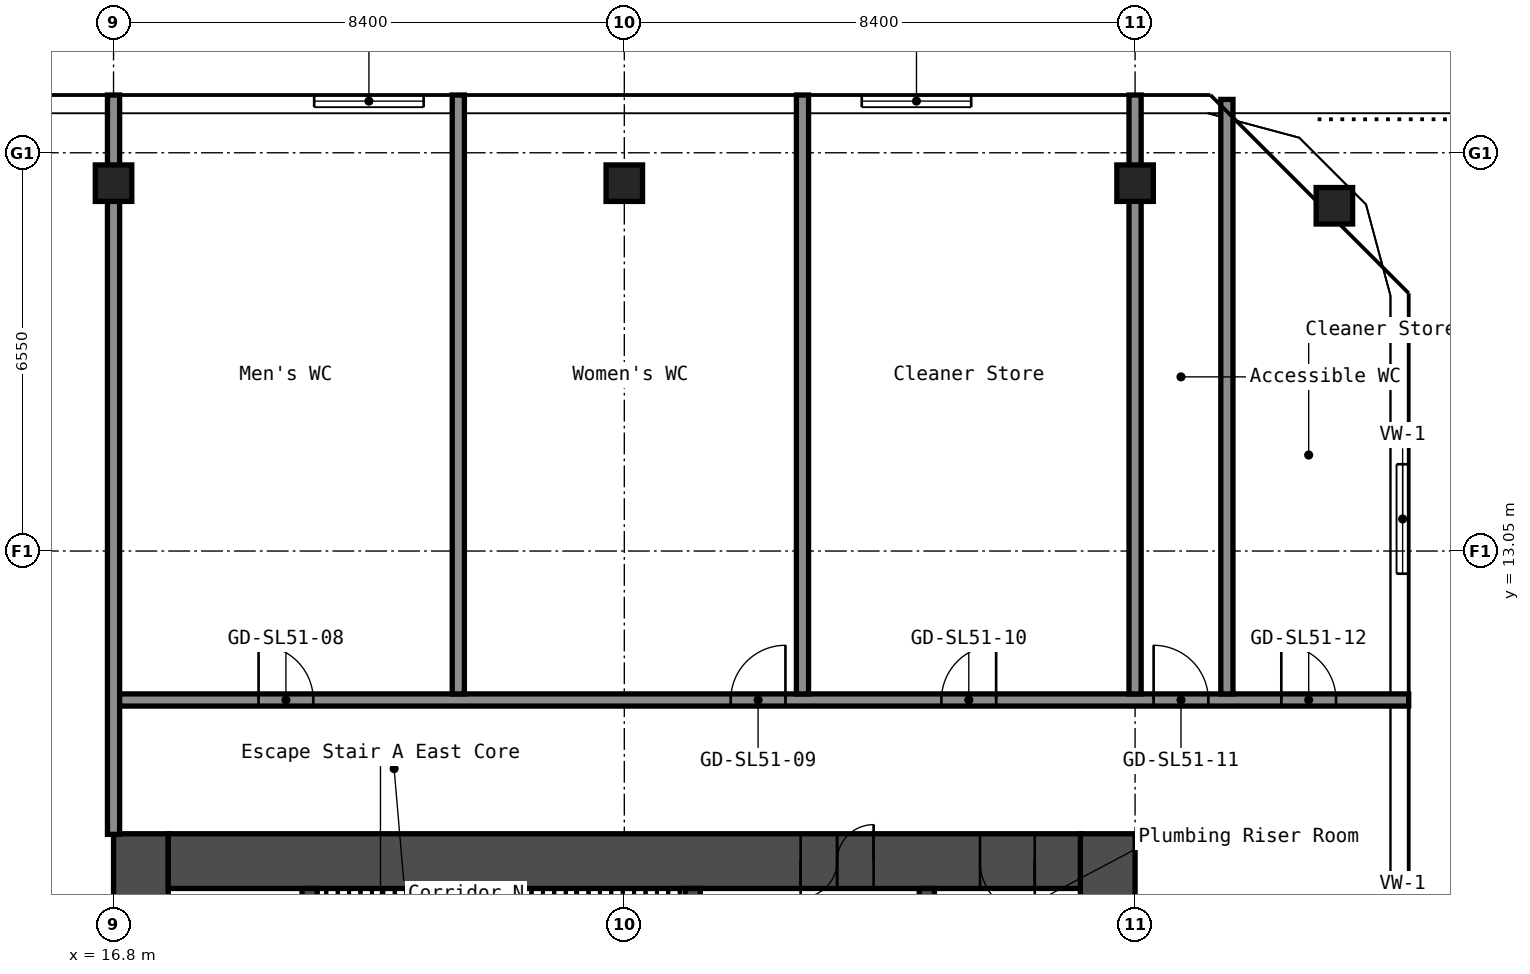
"""IFC4 building model, lengths in metres.
Left out: names, types, materials, properties, quantities, classifications, styles, units other than length and angle.
Written with IfcOpenShell. Run it as: python <this file> out.ifc"""

import sys

from ifc_helpers import new_model, si_unit, direction, frame, frame_2d, origin, origin_2d, place, context, subcontext, project, spatial, rectangle, hollow_rectangle, extrude, element, fill, save


model = new_model("IFC4")
c1 = context("Model", 3, precision=1e-05, world=origin(), true_north=direction((0.0, 1.0)))
c2 = subcontext(c1, "Body", "Model", "MODEL_VIEW")
j1 = project(units=[si_unit("LENGTHUNIT", "METRE"), si_unit("PLANEANGLEUNIT", "RADIAN")], contexts=[c1])
p1 = place(None, origin())
s1 = spatial("IfcSite", under=j1, at=p1, CompositionType="ELEMENT")
p2 = place(p1, origin())
s2 = spatial("IfcBuilding", under=s1, at=p2, CompositionType="ELEMENT")
p3 = place(p2, frame((0.0, 0.0, 180.2)))
s3 = spatial("IfcBuildingStorey", under=s2, at=p3, CompositionType="ELEMENT", Elevation=180.2)
for number, where, z_axis, x_axis in (
    (1, (16.8, 19.1, 0.0), (0.0, 0.0, 1.0), (1.0, 0.0, 0.0)),
    (2, (25.2, 19.1, 0.0), (0.0, 0.0, 1.0), (1.0, 0.0, 0.0)),
    (3, (33.6, 19.1, 0.0), (0.0, 0.0, 1.0), (1.0, 0.0, 0.0)),
    (4, (36.878, 18.729, 0.0), (0.0, 0.0, 1.0), (1.0, 0.0, 0.0)),
):
    element("IfcColumn", number, at=place(p3, frame(where, z_axis=z_axis, x_axis=x_axis)), inside=s3, PredefinedType="COLUMN", context=c2, shape_type="SweptSolid", body=[
        extrude(hollow_rectangle(XDim=0.6, YDim=0.6, WallThickness=0.025, InnerFilletRadius=0.038, OuterFilletRadius=0.062, at=origin_2d()), origin(), (0.0, 0.0, 1.0), 5.95),
    ])
p4 = place(p3, frame((17.25, -8.4, 0.0), z_axis=(0.0, 0.0, 1.0), x_axis=(0.0, 1.0, 0.0)))
e5 = element("IfcWall", 5, at=p4, inside=s3, PredefinedType="SHEAR", context=c2, shape_type="SweptSolid", body=[
    extrude(rectangle(XDim=16.8, YDim=0.9, at=frame_2d((8.4, 0.0))), origin(), (0.0, 0.0, 1.0), 5.95),
])
p5 = place(p4, frame((10.1, 0.0, 0.0)))
e6 = element("IfcOpeningElement", 6, at=p5, cuts=e5, PredefinedType="OPENING", context=c2, shape_type="SweptSolid", body=[
    extrude(rectangle(XDim=1.6, YDim=2.1, at=frame_2d((0.8, 1.05))), frame((0.0, 0.46, 0.0), z_axis=(0.0, -1.0, 0.0), x_axis=(1.0, 0.0, 0.0)), (0.0, 0.0, 1.0), 0.92),
])
p6 = place(p3, frame((33.15, -8.4, 0.0), z_axis=(0.0, 0.0, 1.0), x_axis=(0.0, 1.0, 0.0)))
e7 = element("IfcWall", 7, at=p6, inside=s3, PredefinedType="SHEAR", context=c2, shape_type="SweptSolid", body=[
    extrude(rectangle(XDim=16.8, YDim=0.9, at=frame_2d((8.4, 0.0))), origin(), (0.0, 0.0, 1.0), 5.95),
])
p7 = place(p3, frame((17.7, 7.95, 0.0), z_axis=(0.0, 0.0, 1.0), x_axis=(1.0, 0.0, 0.0)))
e8 = element("IfcWall", 8, at=p7, inside=s3, PredefinedType="SHEAR", context=c2, shape_type="SweptSolid", body=[
    extrude(rectangle(XDim=15.0, YDim=0.9, at=frame_2d((7.5, 0.0))), origin(), (0.0, 0.0, 1.0), 5.95),
])
p8 = place(p7, frame((10.4, 0.0, 0.0)))
e9 = element("IfcOpeningElement", 9, at=p8, cuts=e8, PredefinedType="OPENING", context=c2, shape_type="SweptSolid", body=[
    extrude(rectangle(XDim=1.2, YDim=2.1, at=frame_2d((0.6, 1.05))), frame((0.0, 0.46, 0.0), z_axis=(0.0, -1.0, 0.0), x_axis=(1.0, 0.0, 0.0)), (0.0, 0.0, 1.0), 0.92),
])
p9 = place(p7, frame((13.35, 0.0, 0.0)))
e10 = element("IfcOpeningElement", 10, at=p9, cuts=e8, PredefinedType="OPENING", context=c2, shape_type="SweptSolid", body=[
    extrude(rectangle(XDim=0.9, YDim=2.1, at=frame_2d((0.45, 1.05))), frame((0.0, 0.46, 0.0), z_axis=(0.0, -1.0, 0.0), x_axis=(1.0, 0.0, 0.0)), (0.0, 0.0, 1.0), 0.92),
])
p10 = place(p3, frame((20.025, 1.2, 0.0), z_axis=(0.0, 0.0, 1.0), x_axis=(0.0, 1.0, 0.0)))
e11 = element("IfcWall", 11, at=p10, inside=s3, PredefinedType="SHEAR", context=c2, shape_type="SweptSolid", body=[
    extrude(rectangle(XDim=6.3, YDim=0.25, at=frame_2d((3.15, 0.0))), origin(), (0.0, 0.0, 1.0), 5.95),
])
p11 = place(p3, frame((26.325, 3.75, 0.0), z_axis=(0.0, 0.0, 1.0), x_axis=(0.0, 1.0, 0.0)))
e12 = element("IfcWall", 12, at=p11, inside=s3, PredefinedType="SHEAR", context=c2, shape_type="SweptSolid", body=[
    extrude(rectangle(XDim=3.75, YDim=0.25, at=frame_2d((1.875, 0.0))), origin(), (0.0, 0.0, 1.0), 5.95),
])
p12 = place(p11, frame((1.25, 0.0, 0.0)))
e13 = element("IfcOpeningElement", 13, at=p12, cuts=e12, PredefinedType="OPENING", context=c2, shape_type="SweptSolid", body=[
    extrude(rectangle(XDim=1.2, YDim=2.1, at=frame_2d((0.6, 1.05))), frame((0.0, 0.135, 0.0), z_axis=(0.0, -1.0, 0.0), x_axis=(1.0, 0.0, 0.0)), (0.0, 0.0, 1.0), 0.27),
])
p13 = place(p3, frame((30.175, 1.45, 0.0), z_axis=(0.0, 0.0, 1.0), x_axis=(0.0, 1.0, 0.0)))
e14 = element("IfcWall", 14, at=p13, inside=s3, PredefinedType="SHEAR", context=c2, shape_type="SweptSolid", body=[
    extrude(rectangle(XDim=6.05, YDim=0.25, at=frame_2d((3.025, 0.0))), origin(), (0.0, 0.0, 1.0), 5.95),
])
p14 = place(p13, frame((2.625, 0.0, 0.0)))
e15 = element("IfcOpeningElement", 15, at=p14, cuts=e14, PredefinedType="OPENING", context=c2, shape_type="SweptSolid", body=[
    extrude(rectangle(XDim=1.1, YDim=2.1, at=frame_2d((0.55, 1.05))), frame((0.0, 0.135, 0.0), z_axis=(0.0, -1.0, 0.0), x_axis=(1.0, 0.0, 0.0)), (0.0, 0.0, 1.0), 0.27),
])
p15 = place(p3, frame((16.8, 10.6, 0.0), z_axis=(0.0, 0.0, 1.0), x_axis=(1.0, 0.0, 0.0)))
e16 = element("IfcWall", 16, at=p15, inside=s3, PredefinedType="PARTITIONING", context=c2, shape_type="SweptSolid", body=[
    extrude(rectangle(XDim=21.3, YDim=0.2, at=frame_2d((10.65, 0.0))), origin(), (0.0, 0.0, 1.0), 5.95),
])
p16 = place(p15, frame((2.385, 0.0, 0.0)))
e17 = element("IfcOpeningElement", 17, at=p16, cuts=e16, PredefinedType="OPENING", context=c2, shape_type="SweptSolid", body=[
    extrude(rectangle(XDim=0.9, YDim=2.1, at=frame_2d((0.45, 1.05))), frame((0.0, 0.11, 0.0), z_axis=(0.0, -1.0, 0.0), x_axis=(1.0, 0.0, 0.0)), (0.0, 0.0, 1.0), 0.22),
])
p17 = place(p15, frame((10.15, 0.0, 0.0)))
e18 = element("IfcOpeningElement", 18, at=p17, cuts=e16, PredefinedType="OPENING", context=c2, shape_type="SweptSolid", body=[
    extrude(rectangle(XDim=0.9, YDim=2.1, at=frame_2d((0.45, 1.05))), frame((0.0, 0.11, 0.0), z_axis=(0.0, -1.0, 0.0), x_axis=(1.0, 0.0, 0.0)), (0.0, 0.0, 1.0), 0.22),
])
p18 = place(p15, frame((13.615, 0.0, 0.0)))
e19 = element("IfcOpeningElement", 19, at=p18, cuts=e16, PredefinedType="OPENING", context=c2, shape_type="SweptSolid", body=[
    extrude(rectangle(XDim=0.9, YDim=2.1, at=frame_2d((0.45, 1.05))), frame((0.0, 0.11, 0.0), z_axis=(0.0, -1.0, 0.0), x_axis=(1.0, 0.0, 0.0)), (0.0, 0.0, 1.0), 0.22),
])
p19 = place(p15, frame((17.105, 0.0, 0.0)))
e20 = element("IfcOpeningElement", 20, at=p19, cuts=e16, PredefinedType="OPENING", context=c2, shape_type="SweptSolid", body=[
    extrude(rectangle(XDim=0.9, YDim=2.1, at=frame_2d((0.45, 1.05))), frame((0.0, 0.11, 0.0), z_axis=(0.0, -1.0, 0.0), x_axis=(1.0, 0.0, 0.0)), (0.0, 0.0, 1.0), 0.22),
])
p20 = place(p15, frame((19.205, 0.0, 0.0)))
e21 = element("IfcOpeningElement", 21, at=p20, cuts=e16, PredefinedType="OPENING", context=c2, shape_type="SweptSolid", body=[
    extrude(rectangle(XDim=0.9, YDim=2.1, at=frame_2d((0.45, 1.05))), frame((0.0, 0.11, 0.0), z_axis=(0.0, -1.0, 0.0), x_axis=(1.0, 0.0, 0.0)), (0.0, 0.0, 1.0), 0.22),
])
p21 = place(p3, frame((16.8, 8.39, 0.0), z_axis=(0.0, 0.0, 1.0), x_axis=(0.0, 1.0, 0.0)))
e22 = element("IfcWall", 22, at=p21, inside=s3, PredefinedType="PARTITIONING", context=c2, shape_type="SweptSolid", body=[
    extrude(rectangle(XDim=12.16, YDim=0.2, at=frame_2d((6.08, 0.0))), origin(), (0.0, 0.0, 1.0), 5.95),
])
for number, where, z_axis, x_axis in (
    (23, (22.47, 10.7, 0.0), (0.0, 0.0, 1.0), (0.0, 1.0, 0.0)),
    (24, (28.13, 10.7, 0.0), (0.0, 0.0, 1.0), (0.0, 1.0, 0.0)),
    (25, (33.6, 10.7, 0.0), (0.0, 0.0, 1.0), (0.0, 1.0, 0.0)),
):
    element("IfcWall", number, at=place(p3, frame(where, z_axis=z_axis, x_axis=x_axis)), inside=s3, PredefinedType="PARTITIONING", context=c2, shape_type="SweptSolid", body=[
        extrude(rectangle(XDim=9.85, YDim=0.2, at=frame_2d((4.925, 0.0))), origin(), (0.0, 0.0, 1.0), 5.95),
    ])
p22 = place(p3, frame((35.11, 10.7, 0.0), z_axis=(0.0, 0.0, 1.0), x_axis=(0.0, 1.0, 0.0)))
e26 = element("IfcWall", 26, at=p22, inside=s3, PredefinedType="PARTITIONING", context=c2, shape_type="SweptSolid", body=[
    extrude(rectangle(XDim=9.778, YDim=0.2, at=frame_2d((4.889, 0.0))), origin(), (0.0, 0.0, 1.0), 5.95),
])
p23 = place(p3, frame((38.0, 9.895, 4.45), z_axis=(0.0, 0.0, 1.0), x_axis=(0.0, 1.0, 0.0)))
p24 = place(p23, frame((2.782, 0.0, 0.25)))
p25 = place(p24, origin())
e27 = element("IfcWindow", 27, at=p25, inside=s3, PartitioningType="SINGLE_PANEL", PredefinedType="WINDOW", context=c2, shape_type="SweptSolid", body=[
    extrude(rectangle(XDim=1.8, YDim=0.9, at=frame_2d((0.9, 0.45))), frame((0.0, 0.03, 0.0), z_axis=(0.0, -1.0, 0.0), x_axis=(1.0, 0.0, 0.0)), (0.0, 0.0, 1.0), 0.06),
])
p26 = place(p3, frame((34.81, 20.45, 4.45), z_axis=(0.0, 0.0, 1.0), x_axis=(-1.0, 0.0, 0.0)))
p27 = place(p26, frame((3.905, 0.0, 0.25)))
p28 = place(p27, origin())
e28 = element("IfcWindow", 28, at=p28, inside=s3, PartitioningType="SINGLE_PANEL", PredefinedType="WINDOW", context=c2, shape_type="SweptSolid", body=[
    extrude(rectangle(XDim=1.8, YDim=0.9, at=frame_2d((0.9, 0.45))), frame((0.0, 0.03, 0.0), z_axis=(0.0, -1.0, 0.0), x_axis=(1.0, 0.0, 0.0)), (0.0, 0.0, 1.0), 0.06),
])
p29 = place(p3, frame((25.2, 20.45, 4.45), z_axis=(0.0, 0.0, 1.0), x_axis=(-1.0, 0.0, 0.0)))
p30 = place(p29, frame((3.3, 0.0, 0.25)))
p31 = place(p30, origin())
e29 = element("IfcWindow", 29, at=p31, inside=s3, PartitioningType="SINGLE_PANEL", PredefinedType="WINDOW", context=c2, shape_type="SweptSolid", body=[
    extrude(rectangle(XDim=1.8, YDim=0.9, at=frame_2d((0.9, 0.45))), frame((0.0, 0.03, 0.0), z_axis=(0.0, -1.0, 0.0), x_axis=(1.0, 0.0, 0.0)), (0.0, 0.0, 1.0), 0.06),
])
p32 = place(p8, origin())
e30 = element("IfcDoor", 30, at=p32, inside=s3, OperationType="DOUBLE_DOOR_SINGLE_SWING", PredefinedType="DOOR", context=c2, shape_type="SweptSolid", body=[
    extrude(rectangle(XDim=1.2, YDim=2.1, at=frame_2d((0.6, 1.05))), frame((0.0, 0.025, 0.0), z_axis=(0.0, -1.0, 0.0), x_axis=(1.0, 0.0, 0.0)), (0.0, 0.0, 1.0), 0.05),
])
fill(e9, e30)
p33 = place(p9, origin())
e31 = element("IfcDoor", 31, at=p33, inside=s3, OperationType="SINGLE_SWING_RIGHT", PredefinedType="DOOR", context=c2, shape_type="SweptSolid", body=[
    extrude(rectangle(XDim=0.9, YDim=2.1, at=frame_2d((0.45, 1.05))), frame((0.0, 0.025, 0.0), z_axis=(0.0, -1.0, 0.0), x_axis=(1.0, 0.0, 0.0)), (0.0, 0.0, 1.0), 0.05),
])
fill(e10, e31)
p34 = place(p16, origin())
e32 = element("IfcDoor", 32, at=p34, inside=s3, OperationType="SINGLE_SWING_RIGHT", PredefinedType="DOOR", context=c2, shape_type="SweptSolid", body=[
    extrude(rectangle(XDim=0.9, YDim=2.1, at=frame_2d((0.45, 1.05))), frame((0.0, 0.025, 0.0), z_axis=(0.0, -1.0, 0.0), x_axis=(1.0, 0.0, 0.0)), (0.0, 0.0, 1.0), 0.05),
])
fill(e17, e32)
p35 = place(p17, origin())
e33 = element("IfcDoor", 33, at=p35, inside=s3, OperationType="SINGLE_SWING_LEFT", PredefinedType="DOOR", context=c2, shape_type="SweptSolid", body=[
    extrude(rectangle(XDim=0.9, YDim=2.1, at=frame_2d((0.45, 1.05))), frame((0.0, 0.025, 0.0), z_axis=(0.0, -1.0, 0.0), x_axis=(1.0, 0.0, 0.0)), (0.0, 0.0, 1.0), 0.05),
])
fill(e18, e33)
p36 = place(p18, origin())
e34 = element("IfcDoor", 34, at=p36, inside=s3, OperationType="SINGLE_SWING_LEFT", PredefinedType="DOOR", context=c2, shape_type="SweptSolid", body=[
    extrude(rectangle(XDim=0.9, YDim=2.1, at=frame_2d((0.45, 1.05))), frame((0.0, 0.025, 0.0), z_axis=(0.0, -1.0, 0.0), x_axis=(1.0, 0.0, 0.0)), (0.0, 0.0, 1.0), 0.05),
])
fill(e19, e34)
p37 = place(p19, origin())
e35 = element("IfcDoor", 35, at=p37, inside=s3, OperationType="SINGLE_SWING_RIGHT", PredefinedType="DOOR", context=c2, shape_type="SweptSolid", body=[
    extrude(rectangle(XDim=0.9, YDim=2.1, at=frame_2d((0.45, 1.05))), frame((0.0, 0.025, 0.0), z_axis=(0.0, -1.0, 0.0), x_axis=(1.0, 0.0, 0.0)), (0.0, 0.0, 1.0), 0.05),
])
fill(e20, e35)
p38 = place(p20, origin())
e36 = element("IfcDoor", 36, at=p38, inside=s3, OperationType="SINGLE_SWING_RIGHT", PredefinedType="DOOR", context=c2, shape_type="SweptSolid", body=[
    extrude(rectangle(XDim=0.9, YDim=2.1, at=frame_2d((0.45, 1.05))), frame((0.0, 0.025, 0.0), z_axis=(0.0, -1.0, 0.0), x_axis=(1.0, 0.0, 0.0)), (0.0, 0.0, 1.0), 0.05),
])
fill(e21, e36)
save(model, sys.argv[1])
